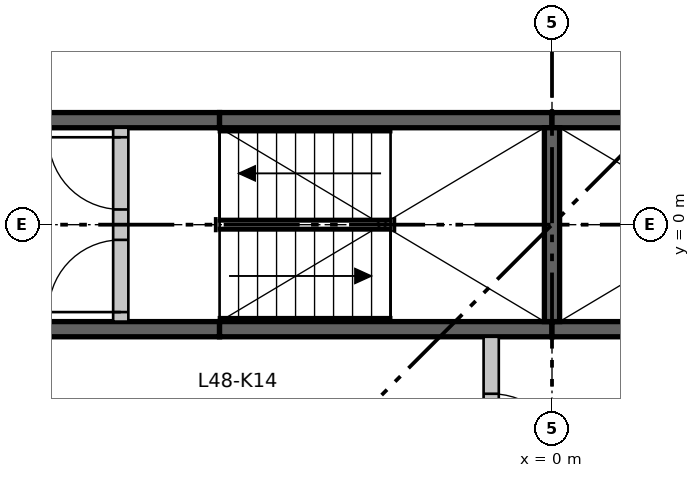
"""IFC4 building model, lengths in metres.
Left out: names, types, materials, properties, quantities, classifications, styles, units other than length and angle.
Written with IfcOpenShell. Run it as: python <this file> out.ifc"""

import sys

from ifc_helpers import new_model, si_unit, direction, frame, frame_2d, origin, place, context, subcontext, project, spatial, rectangle, extrude, element, fill, save


model = new_model("IFC4")
c1 = context("Model", 3, precision=1e-05, world=origin(), true_north=direction((0.0, 1.0)))
c2 = subcontext(c1, "Body", "Model", "MODEL_VIEW")
j1 = project(units=[si_unit("LENGTHUNIT", "METRE"), si_unit("PLANEANGLEUNIT", "RADIAN")], contexts=[c1])
p1 = place(None, origin())
s1 = spatial("IfcSite", under=j1, at=p1, CompositionType="ELEMENT")
p2 = place(p1, origin())
s2 = spatial("IfcBuilding", under=s1, at=p2, CompositionType="ELEMENT")
p3 = place(p2, frame((0.0, 0.0, 180.95)))
s3 = spatial("IfcBuildingStorey", under=s2, at=p3, CompositionType="ELEMENT", Elevation=180.95)
p4 = place(p3, frame((-7.374, -1.375, 0.0), z_axis=(0.0, 0.0, 1.0), x_axis=(1.0, 0.0, 0.0)))
e1 = element("IfcWall", 1, at=p4, inside=s3, PredefinedType="SHEAR", context=c2, shape_type="SweptSolid", body=[
    extrude(rectangle(XDim=3.0, YDim=0.2, at=frame_2d((1.5, 0.0))), origin(), (0.0, 0.0, 1.0), 3.0),
])
for number, where, z_axis, x_axis in (
    (2, (-4.374, -1.375, 0.0), (0.0, 0.0, 1.0), (1.0, 0.0, 0.0)),
    (3, (0.0, -1.375, 0.0), (0.0, 0.0, 1.0), (1.0, 0.0, 0.0)),
):
    element("IfcWall", number, at=place(p3, frame(where, z_axis=z_axis, x_axis=x_axis)), inside=s3, PredefinedType="SHEAR", context=c2, shape_type="SweptSolid", body=[
        extrude(rectangle(XDim=4.374, YDim=0.2, at=frame_2d((2.187, 0.0))), origin(), (0.0, 0.0, 1.0), 3.0),
    ])
p5 = place(p3, frame((-7.374, 1.375, 0.0), z_axis=(0.0, 0.0, 1.0), x_axis=(1.0, 0.0, 0.0)))
e4 = element("IfcWall", 4, at=p5, inside=s3, PredefinedType="SHEAR", context=c2, shape_type="SweptSolid", body=[
    extrude(rectangle(XDim=3.0, YDim=0.2, at=frame_2d((1.5, 0.0))), origin(), (0.0, 0.0, 1.0), 3.0),
])
for number, where, z_axis, x_axis in (
    (5, (-4.374, 1.375, 0.0), (0.0, 0.0, 1.0), (1.0, 0.0, 0.0)),
    (6, (0.0, 1.375, 0.0), (0.0, 0.0, 1.0), (1.0, 0.0, 0.0)),
):
    element("IfcWall", number, at=place(p3, frame(where, z_axis=z_axis, x_axis=x_axis)), inside=s3, PredefinedType="SHEAR", context=c2, shape_type="SweptSolid", body=[
        extrude(rectangle(XDim=4.374, YDim=0.2, at=frame_2d((2.187, 0.0))), origin(), (0.0, 0.0, 1.0), 3.0),
    ])
p6 = place(p3, frame((0.0, -1.275, 0.0), z_axis=(0.0, 0.0, 1.0), x_axis=(0.0, 1.0, 0.0)))
e7 = element("IfcWall", 7, at=p6, inside=s3, PredefinedType="SHEAR", context=c2, shape_type="SweptSolid", body=[
    extrude(rectangle(XDim=2.55, YDim=0.2, at=frame_2d((1.275, 0.0))), origin(), (0.0, 0.0, 1.0), 3.0),
])
p7 = place(p3, frame((-0.8, -3.974, 0.0), z_axis=(0.0, 0.0, 1.0), x_axis=(0.0, 1.0, 0.0)))
e8 = element("IfcWall", 8, at=p7, inside=s3, PredefinedType="PARTITIONING", context=c2, shape_type="SweptSolid", body=[
    extrude(rectangle(XDim=2.499, YDim=0.2, at=frame_2d((1.25, 0.0))), origin(), (0.0, 0.0, 1.0), 3.0),
])
p8 = place(p7, frame((0.75, 0.0, 0.0)))
e9 = element("IfcOpeningElement", 9, at=p8, cuts=e8, PredefinedType="OPENING", context=c2, shape_type="SweptSolid", body=[
    extrude(rectangle(XDim=1.0, YDim=2.1, at=frame_2d((0.5, 1.05))), frame((0.0, 0.11, 0.0), z_axis=(0.0, -1.0, 0.0), x_axis=(1.0, 0.0, 0.0)), (0.0, 0.0, 1.0), 0.22),
])
p9 = place(p3, frame((-5.674, -1.275, 0.0), z_axis=(0.0, 0.0, 1.0), x_axis=(0.0, 1.0, 0.0)))
e10 = element("IfcWall", 10, at=p9, inside=s3, PredefinedType="PARTITIONING", context=c2, shape_type="SweptSolid", body=[
    extrude(rectangle(XDim=2.55, YDim=0.2, at=frame_2d((1.275, 0.0))), origin(), (0.0, 0.0, 1.0), 3.0),
])
p10 = place(p9, frame((0.125, 0.0, 0.0)))
e11 = element("IfcOpeningElement", 11, at=p10, cuts=e10, PredefinedType="OPENING", context=c2, shape_type="SweptSolid", body=[
    extrude(rectangle(XDim=0.95, YDim=2.1, at=frame_2d((0.475, 1.05))), frame((0.0, 0.11, 0.0), z_axis=(0.0, -1.0, 0.0), x_axis=(1.0, 0.0, 0.0)), (0.0, 0.0, 1.0), 0.22),
])
p11 = place(p9, frame((1.475, 0.0, 0.0)))
e12 = element("IfcOpeningElement", 12, at=p11, cuts=e10, PredefinedType="OPENING", context=c2, shape_type="SweptSolid", body=[
    extrude(rectangle(XDim=0.95, YDim=2.1, at=frame_2d((0.475, 1.05))), frame((0.0, 0.11, 0.0), z_axis=(0.0, -1.0, 0.0), x_axis=(1.0, 0.0, 0.0)), (0.0, 0.0, 1.0), 0.22),
])
p12 = place(p10, origin())
e13 = element("IfcDoor", 13, at=p12, inside=s3, OperationType="SINGLE_SWING_LEFT", PredefinedType="DOOR", context=c2, shape_type="SweptSolid", body=[
    extrude(rectangle(XDim=0.95, YDim=2.1, at=frame_2d((0.475, 1.05))), frame((0.0, 0.025, 0.0), z_axis=(0.0, -1.0, 0.0), x_axis=(1.0, 0.0, 0.0)), (0.0, 0.0, 1.0), 0.05),
])
fill(e11, e13)
p13 = place(p11, origin())
e14 = element("IfcDoor", 14, at=p13, inside=s3, OperationType="SINGLE_SWING_RIGHT", PredefinedType="DOOR", context=c2, shape_type="SweptSolid", body=[
    extrude(rectangle(XDim=0.95, YDim=2.1, at=frame_2d((0.475, 1.05))), frame((0.0, 0.025, 0.0), z_axis=(0.0, -1.0, 0.0), x_axis=(1.0, 0.0, 0.0)), (0.0, 0.0, 1.0), 0.05),
])
fill(e12, e14)
p14 = place(p8, frame((1.0, 0.0, 0.0), z_axis=(0.0, 0.0, 1.0), x_axis=(-1.0, 0.0, 0.0)))
e15 = element("IfcDoor", 15, at=p14, inside=s3, OperationType="SINGLE_SWING_LEFT", PredefinedType="DOOR", context=c2, shape_type="SweptSolid", body=[
    extrude(rectangle(XDim=1.0, YDim=2.1, at=frame_2d((0.5, 1.05))), frame((0.0, 0.025, 0.0), z_axis=(0.0, -1.0, 0.0), x_axis=(1.0, 0.0, 0.0)), (0.0, 0.0, 1.0), 0.05),
])
fill(e9, e15)
save(model, sys.argv[1])
